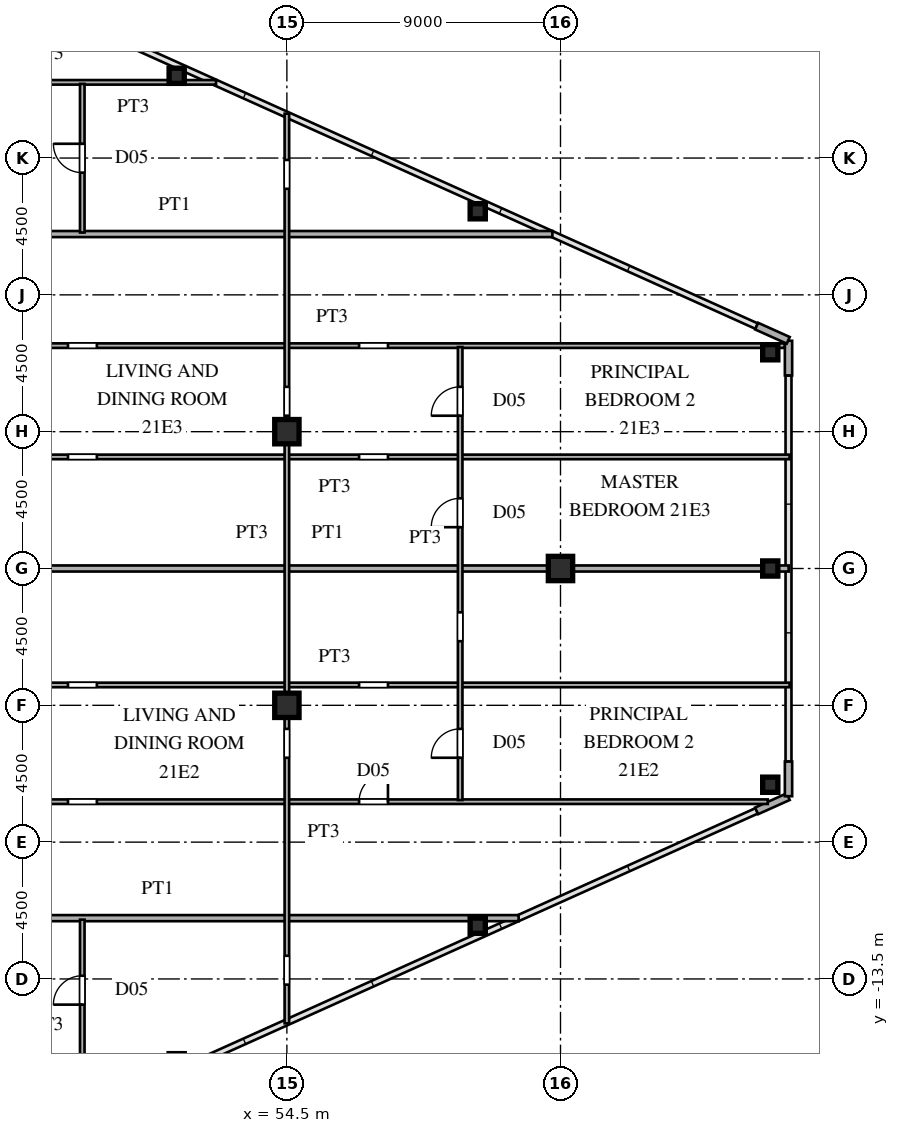
"""IFC4 building model, lengths in metres.
Left out: names, types, materials, properties, quantities, classifications, styles, units other than length and angle.
Written with IfcOpenShell. Run it as: python <this file> out.ifc"""

import sys

from ifc_helpers import new_model, si_unit, direction, frame, frame_2d, origin, origin_2d, place, context, subcontext, project, spatial, rectangle, hollow_rectangle, i_section, extrude, source, transform, mapped, element, fill, save


model = new_model("IFC4")
c1 = context("Model", 3, precision=1e-05, world=origin(), true_north=direction((0.0, 1.0)))
c2 = subcontext(c1, "Body", "Model", "MODEL_VIEW")
j1 = project(units=[si_unit("LENGTHUNIT", "METRE"), si_unit("PLANEANGLEUNIT", "RADIAN")], contexts=[c1])
p1 = place(None, origin())
s1 = spatial("IfcSite", under=j1, at=p1, CompositionType="ELEMENT")
p2 = place(p1, origin())
s2 = spatial("IfcBuilding", under=s1, at=p2, CompositionType="ELEMENT")
p3 = place(p2, frame((0.0, 0.0, 80.1)))
s3 = spatial("IfcBuildingStorey", under=s2, at=p3, CompositionType="ELEMENT", Elevation=80.1)
m1 = source(origin(), c2, "Body", "SweptSolid", [
    extrude(i_section(OverallWidth=0.8, OverallDepth=0.8, WebThickness=0.032, FlangeThickness=0.05, at=origin_2d()), origin(), (0.0, 0.0, 1.0), 3.6),
])
for number, where, z_axis, x_axis in (
    (1, (54.5, -4.5, 0.0), (0.0, 0.0, 1.0), (1.0, 0.0, 0.0)),
    (2, (54.5, 4.5, 0.0), (0.0, 0.0, 1.0), (1.0, 0.0, 0.0)),
    (3, (63.5, 0.0, 0.0), (0.0, 0.0, 1.0), (1.0, 0.0, 0.0)),
):
    element("IfcColumn", number, at=place(p3, frame(where, z_axis=z_axis, x_axis=x_axis)), inside=s3, PredefinedType="COLUMN", context=c2, shape_type="MappedRepresentation", body=[
        mapped(m1, transform((0.0, 0.0, 0.0), scale=1.0)),
    ])
m2 = source(origin(), c2, "Body", "SweptSolid", [
    extrude(hollow_rectangle(XDim=0.5, YDim=0.5, WallThickness=0.02, at=origin_2d()), origin(), (0.0, 0.0, 1.0), 3.6),
])
for number, where, z_axis, x_axis in (
    (4, (70.4, -7.112, 0.0), (0.0, 0.0, 1.0), (1.0, 0.0, 0.0)),
    (5, (70.4, 7.112, 0.0), (0.0, 0.0, 1.0), (1.0, 0.0, 0.0)),
    (6, (60.778, -11.749, 0.0), (0.0, 0.0, 1.0), (1.0, 0.0, 0.0)),
    (7, (50.875, 16.205, 0.0), (0.0, 0.0, 1.0), (1.0, 0.0, 0.0)),
    (8, (60.778, 11.749, 0.0), (0.0, 0.0, 1.0), (1.0, 0.0, 0.0)),
    (9, (70.4, 0.0, 0.0), (0.0, 0.0, 1.0), (1.0, 0.0, 0.0)),
):
    element("IfcColumn", number, at=place(p3, frame(where, z_axis=z_axis, x_axis=x_axis)), inside=s3, PredefinedType="COLUMN", context=c2, shape_type="MappedRepresentation", body=[
        mapped(m2, transform((0.0, 0.0, 0.0), scale=1.0)),
    ])
for number, where, z_axis, x_axis in (
    (10, (69.951, -7.972, 0.0), (0.0, 0.0, 1.0), (0.912, 0.41, 0.0)),
    (11, (71.0, -7.49, 0.0), (0.0, 0.0, 1.0), (0.0, 1.0, 0.0)),
    (12, (71.0, 6.35, 0.0), (0.0, 0.0, 1.0), (0.0, 1.0, 0.0)),
    (13, (70.991, 7.504, 0.0), (0.0, 0.0, 1.0), (-0.912, 0.41, 0.0)),
):
    element("IfcWall", number, at=place(p3, frame(where, z_axis=z_axis, x_axis=x_axis)), inside=s3, PredefinedType="SOLIDWALL", context=c2, shape_type="SweptSolid", body=[
        extrude(rectangle(XDim=1.14, YDim=0.24, at=frame_2d((0.57, 0.0))), origin(), (0.0, 0.0, 1.0), 3.38),
    ])
p4 = place(p3, frame((38.38, -11.5, 0.0), z_axis=(0.0, 0.0, 1.0), x_axis=(1.0, 0.0, 0.0)))
e14 = element("IfcWall", 14, at=p4, inside=s3, PredefinedType="PARTITIONING", context=c2, shape_type="SweptSolid", body=[
    extrude(rectangle(XDim=23.743, YDim=0.2, at=frame_2d((11.872, 0.0))), origin(), (0.0, 0.0, 1.0), 3.38),
])
p5 = place(p3, frame((41.1, -7.67, 0.0), z_axis=(0.0, 0.0, 1.0), x_axis=(1.0, 0.0, 0.0)))
e15 = element("IfcWall", 15, at=p5, inside=s3, PredefinedType="PARTITIONING", context=c2, shape_type="SweptSolid", body=[
    extrude(rectangle(XDim=29.218, YDim=0.15, at=frame_2d((14.609, 0.0))), origin(), (0.0, 0.0, 1.0), 3.38),
])
p6 = place(p5, frame((6.2, 0.0, 0.0)))
e16 = element("IfcOpeningElement", 16, at=p6, cuts=e15, PredefinedType="OPENING", context=c2, shape_type="SweptSolid", body=[
    extrude(rectangle(XDim=0.95, YDim=2.15, at=frame_2d((0.475, 1.075))), frame((0.0, 0.085, 0.0), z_axis=(0.0, -1.0, 0.0), x_axis=(1.0, 0.0, 0.0)), (0.0, 0.0, 1.0), 0.17),
])
p7 = place(p5, frame((15.775, 0.0, 0.0)))
e17 = element("IfcOpeningElement", 17, at=p7, cuts=e15, PredefinedType="OPENING", context=c2, shape_type="SweptSolid", body=[
    extrude(rectangle(XDim=0.95, YDim=2.15, at=frame_2d((0.475, 1.075))), frame((0.0, 0.085, 0.0), z_axis=(0.0, -1.0, 0.0), x_axis=(1.0, 0.0, 0.0)), (0.0, 0.0, 1.0), 0.17),
])
p8 = place(p3, frame((41.1, -3.83, 0.0), z_axis=(0.0, 0.0, 1.0), x_axis=(1.0, 0.0, 0.0)))
e18 = element("IfcWall", 18, at=p8, inside=s3, PredefinedType="PARTITIONING", context=c2, shape_type="SweptSolid", body=[
    extrude(rectangle(XDim=29.935, YDim=0.15, at=frame_2d((14.967, 0.0))), origin(), (0.0, 0.0, 1.0), 3.38),
])
p9 = place(p8, frame((6.2, 0.0, 0.0)))
e19 = element("IfcOpeningElement", 19, at=p9, cuts=e18, PredefinedType="OPENING", context=c2, shape_type="SweptSolid", body=[
    extrude(rectangle(XDim=0.95, YDim=2.15, at=frame_2d((0.475, 1.075))), frame((0.0, 0.085, 0.0), z_axis=(0.0, -1.0, 0.0), x_axis=(1.0, 0.0, 0.0)), (0.0, 0.0, 1.0), 0.17),
])
p10 = place(p8, frame((15.775, 0.0, 0.0)))
e20 = element("IfcOpeningElement", 20, at=p10, cuts=e18, PredefinedType="OPENING", context=c2, shape_type="SweptSolid", body=[
    extrude(rectangle(XDim=0.95, YDim=2.15, at=frame_2d((0.475, 1.075))), frame((0.0, 0.085, 0.0), z_axis=(0.0, -1.0, 0.0), x_axis=(1.0, 0.0, 0.0)), (0.0, 0.0, 1.0), 0.17),
])
p11 = place(p3, frame((38.38, 0.0, 0.0), z_axis=(0.0, 0.0, 1.0), x_axis=(1.0, 0.0, 0.0)))
e21 = element("IfcWall", 21, at=p11, inside=s3, PredefinedType="PARTITIONING", context=c2, shape_type="SweptSolid", body=[
    extrude(rectangle(XDim=25.1, YDim=0.2, at=frame_2d((12.55, 0.0))), origin(), (0.0, 0.0, 1.0), 3.38),
])
p12 = place(p3, frame((63.48, 0.0, 0.0), z_axis=(0.0, 0.0, 1.0), x_axis=(1.0, 0.0, 0.0)))
e22 = element("IfcWall", 22, at=p12, inside=s3, PredefinedType="PARTITIONING", context=c2, shape_type="SweptSolid", body=[
    extrude(rectangle(XDim=7.525, YDim=0.2, at=frame_2d((3.762, 0.0))), origin(), (0.0, 0.0, 1.0), 2.68),
])
p13 = place(p3, frame((41.1, 3.67, 0.0), z_axis=(0.0, 0.0, 1.0), x_axis=(1.0, 0.0, 0.0)))
e23 = element("IfcWall", 23, at=p13, inside=s3, PredefinedType="PARTITIONING", context=c2, shape_type="SweptSolid", body=[
    extrude(rectangle(XDim=29.935, YDim=0.15, at=frame_2d((14.967, 0.0))), origin(), (0.0, 0.0, 1.0), 3.38),
])
p14 = place(p13, frame((6.2, 0.0, 0.0)))
e24 = element("IfcOpeningElement", 24, at=p14, cuts=e23, PredefinedType="OPENING", context=c2, shape_type="SweptSolid", body=[
    extrude(rectangle(XDim=0.95, YDim=2.15, at=frame_2d((0.475, 1.075))), frame((0.0, 0.085, 0.0), z_axis=(0.0, -1.0, 0.0), x_axis=(1.0, 0.0, 0.0)), (0.0, 0.0, 1.0), 0.17),
])
p15 = place(p13, frame((15.775, 0.0, 0.0)))
e25 = element("IfcOpeningElement", 25, at=p15, cuts=e23, PredefinedType="OPENING", context=c2, shape_type="SweptSolid", body=[
    extrude(rectangle(XDim=0.95, YDim=2.15, at=frame_2d((0.475, 1.075))), frame((0.0, 0.085, 0.0), z_axis=(0.0, -1.0, 0.0), x_axis=(1.0, 0.0, 0.0)), (0.0, 0.0, 1.0), 0.17),
])
p16 = place(p3, frame((41.1, 7.33, 0.0), z_axis=(0.0, 0.0, 1.0), x_axis=(1.0, 0.0, 0.0)))
e26 = element("IfcWall", 26, at=p16, inside=s3, PredefinedType="PARTITIONING", context=c2, shape_type="SweptSolid", body=[
    extrude(rectangle(XDim=29.775, YDim=0.15, at=frame_2d((14.887, 0.0))), origin(), (0.0, 0.0, 1.0), 3.38),
])
p17 = place(p16, frame((6.2, 0.0, 0.0)))
e27 = element("IfcOpeningElement", 27, at=p17, cuts=e26, PredefinedType="OPENING", context=c2, shape_type="SweptSolid", body=[
    extrude(rectangle(XDim=0.95, YDim=2.15, at=frame_2d((0.475, 1.075))), frame((0.0, 0.085, 0.0), z_axis=(0.0, -1.0, 0.0), x_axis=(1.0, 0.0, 0.0)), (0.0, 0.0, 1.0), 0.17),
])
p18 = place(p16, frame((15.775, 0.0, 0.0)))
e28 = element("IfcOpeningElement", 28, at=p18, cuts=e26, PredefinedType="OPENING", context=c2, shape_type="SweptSolid", body=[
    extrude(rectangle(XDim=0.95, YDim=2.15, at=frame_2d((0.475, 1.075))), frame((0.0, 0.085, 0.0), z_axis=(0.0, -1.0, 0.0), x_axis=(1.0, 0.0, 0.0)), (0.0, 0.0, 1.0), 0.17),
])
p19 = place(p3, frame((38.38, 11.0, 0.0), z_axis=(0.0, 0.0, 1.0), x_axis=(1.0, 0.0, 0.0)))
e29 = element("IfcWall", 29, at=p19, inside=s3, PredefinedType="PARTITIONING", context=c2, shape_type="SweptSolid", body=[
    extrude(rectangle(XDim=24.854, YDim=0.2, at=frame_2d((12.427, 0.0))), origin(), (0.0, 0.0, 1.0), 3.38),
])
p20 = place(p3, frame((41.1, 15.99, 0.0), z_axis=(0.0, 0.0, 1.0), x_axis=(1.0, 0.0, 0.0)))
e30 = element("IfcWall", 30, at=p20, inside=s3, PredefinedType="PARTITIONING", context=c2, shape_type="SweptSolid", body=[
    extrude(rectangle(XDim=11.071, YDim=0.15, at=frame_2d((5.535, 0.0))), origin(), (0.0, 0.0, 1.0), 3.38),
])
p21 = place(p20, frame((2.837, 0.0, 0.0)))
e31 = element("IfcOpeningElement", 31, at=p21, cuts=e30, PredefinedType="OPENING", context=c2, shape_type="SweptSolid", body=[
    extrude(rectangle(XDim=0.95, YDim=2.15, at=frame_2d((0.475, 1.075))), frame((0.0, 0.085, 0.0), z_axis=(0.0, -1.0, 0.0), x_axis=(1.0, 0.0, 0.0)), (0.0, 0.0, 1.0), 0.17),
])
p22 = place(p3, frame((47.77, -16.189, 0.0), z_axis=(0.0, 0.0, 1.0), x_axis=(0.0, 1.0, 0.0)))
e32 = element("IfcWall", 32, at=p22, inside=s3, PredefinedType="PARTITIONING", context=c2, shape_type="SweptSolid", body=[
    extrude(rectangle(XDim=4.639, YDim=0.15, at=frame_2d((2.319, 0.0))), origin(), (0.0, 0.0, 1.0), 3.38),
])
p23 = place(p22, frame((1.844, 0.0, 0.0)))
e33 = element("IfcOpeningElement", 33, at=p23, cuts=e32, PredefinedType="OPENING", context=c2, shape_type="SweptSolid", body=[
    extrude(rectangle(XDim=0.95, YDim=2.15, at=frame_2d((0.475, 1.075))), frame((0.0, 0.085, 0.0), z_axis=(0.0, -1.0, 0.0), x_axis=(1.0, 0.0, 0.0)), (0.0, 0.0, 1.0), 0.17),
])
p24 = place(p3, frame((47.77, 11.05, 0.0), z_axis=(0.0, 0.0, 1.0), x_axis=(0.0, 1.0, 0.0)))
e34 = element("IfcWall", 34, at=p24, inside=s3, PredefinedType="PARTITIONING", context=c2, shape_type="SweptSolid", body=[
    extrude(rectangle(XDim=4.889, YDim=0.15, at=frame_2d((2.444, 0.0))), origin(), (0.0, 0.0, 1.0), 3.38),
])
p25 = place(p24, frame((1.969, 0.0, 0.0)))
e35 = element("IfcOpeningElement", 35, at=p25, cuts=e34, PredefinedType="OPENING", context=c2, shape_type="SweptSolid", body=[
    extrude(rectangle(XDim=0.95, YDim=2.15, at=frame_2d((0.475, 1.075))), frame((0.0, 0.085, 0.0), z_axis=(0.0, -1.0, 0.0), x_axis=(1.0, 0.0, 0.0)), (0.0, 0.0, 1.0), 0.17),
])
p26 = place(p3, frame((54.5, -14.96, 0.0), z_axis=(0.0, 0.0, 1.0), x_axis=(0.0, 1.0, 0.0)))
e36 = element("IfcWall", 36, at=p26, inside=s3, PredefinedType="PARTITIONING", context=c2, shape_type="SweptSolid", body=[
    extrude(rectangle(XDim=29.92, YDim=0.15, at=frame_2d((14.96, 0.0))), origin(), (0.0, 0.0, 1.0), 2.68),
])
p27 = place(p26, frame((1.272, 0.0, 0.0)))
e37 = element("IfcOpeningElement", 37, at=p27, cuts=e36, PredefinedType="OPENING", context=c2, shape_type="SweptSolid", body=[
    extrude(rectangle(XDim=0.95, YDim=2.15, at=frame_2d((0.475, 1.075))), frame((0.0, 0.085, 0.0), z_axis=(0.0, -1.0, 0.0), x_axis=(1.0, 0.0, 0.0)), (0.0, 0.0, 1.0), 0.17),
])
p28 = place(p26, frame((8.735, 0.0, 0.0)))
e38 = element("IfcOpeningElement", 38, at=p28, cuts=e36, PredefinedType="OPENING", context=c2, shape_type="SweptSolid", body=[
    extrude(rectangle(XDim=0.95, YDim=2.15, at=frame_2d((0.475, 1.075))), frame((0.0, 0.085, 0.0), z_axis=(0.0, -1.0, 0.0), x_axis=(1.0, 0.0, 0.0)), (0.0, 0.0, 1.0), 0.17),
])
p29 = place(p26, frame((19.985, 0.0, 0.0)))
e39 = element("IfcOpeningElement", 39, at=p29, cuts=e36, PredefinedType="OPENING", context=c2, shape_type="SweptSolid", body=[
    extrude(rectangle(XDim=0.95, YDim=2.15, at=frame_2d((0.475, 1.075))), frame((0.0, 0.085, 0.0), z_axis=(0.0, -1.0, 0.0), x_axis=(1.0, 0.0, 0.0)), (0.0, 0.0, 1.0), 0.17),
])
p30 = place(p26, frame((27.448, 0.0, 0.0)))
e40 = element("IfcOpeningElement", 40, at=p30, cuts=e36, PredefinedType="OPENING", context=c2, shape_type="SweptSolid", body=[
    extrude(rectangle(XDim=0.95, YDim=2.15, at=frame_2d((0.475, 1.075))), frame((0.0, 0.085, 0.0), z_axis=(0.0, -1.0, 0.0), x_axis=(1.0, 0.0, 0.0)), (0.0, 0.0, 1.0), 0.17),
])
p31 = place(p3, frame((60.2, -7.617, 0.0), z_axis=(0.0, 0.0, 1.0), x_axis=(0.0, 1.0, 0.0)))
e41 = element("IfcWall", 41, at=p31, inside=s3, PredefinedType="PARTITIONING", context=c2, shape_type="SweptSolid", body=[
    extrude(rectangle(XDim=14.9, YDim=0.15, at=frame_2d((7.45, 0.0))), origin(), (0.0, 0.0, 1.0), 3.38),
])
p32 = place(p31, frame((1.392, 0.0, 0.0)))
e42 = element("IfcOpeningElement", 42, at=p32, cuts=e41, PredefinedType="OPENING", context=c2, shape_type="SweptSolid", body=[
    extrude(rectangle(XDim=0.95, YDim=2.15, at=frame_2d((0.475, 1.075))), frame((0.0, 0.085, 0.0), z_axis=(0.0, -1.0, 0.0), x_axis=(1.0, 0.0, 0.0)), (0.0, 0.0, 1.0), 0.17),
])
p33 = place(p31, frame((5.225, 0.0, 0.0)))
e43 = element("IfcOpeningElement", 43, at=p33, cuts=e41, PredefinedType="OPENING", context=c2, shape_type="SweptSolid", body=[
    extrude(rectangle(XDim=0.95, YDim=2.15, at=frame_2d((0.475, 1.075))), frame((0.0, 0.085, 0.0), z_axis=(0.0, -1.0, 0.0), x_axis=(1.0, 0.0, 0.0)), (0.0, 0.0, 1.0), 0.17),
])
p34 = place(p31, frame((8.975, 0.0, 0.0)))
e44 = element("IfcOpeningElement", 44, at=p34, cuts=e41, PredefinedType="OPENING", context=c2, shape_type="SweptSolid", body=[
    extrude(rectangle(XDim=0.95, YDim=2.15, at=frame_2d((0.475, 1.075))), frame((0.0, 0.085, 0.0), z_axis=(0.0, -1.0, 0.0), x_axis=(1.0, 0.0, 0.0)), (0.0, 0.0, 1.0), 0.17),
])
p35 = place(p31, frame((12.642, 0.0, 0.0)))
e45 = element("IfcOpeningElement", 45, at=p35, cuts=e41, PredefinedType="OPENING", context=c2, shape_type="SweptSolid", body=[
    extrude(rectangle(XDim=0.95, YDim=2.15, at=frame_2d((0.475, 1.075))), frame((0.0, 0.085, 0.0), z_axis=(0.0, -1.0, 0.0), x_axis=(1.0, 0.0, 0.0)), (0.0, 0.0, 1.0), 0.17),
])
m3 = source(origin(), c2, "Body", "SweptSolid", [
    extrude(rectangle(XDim=0.95, YDim=2.15, at=frame_2d((0.475, 1.075))), frame((0.0, 0.025, 0.0), z_axis=(0.0, -1.0, 0.0), x_axis=(1.0, 0.0, 0.0)), (0.0, 0.0, 1.0), 0.05),
])
p36 = place(p7, origin())
e46 = element("IfcDoor", 46, at=p36, inside=s3, OperationType="SINGLE_SWING_RIGHT", PredefinedType="DOOR", context=c2, shape_type="MappedRepresentation", body=[
    mapped(m3, transform((0.0, 0.0, 0.0), scale=1.0)),
])
fill(e17, e46)
p37 = place(p23, origin())
e47 = element("IfcDoor", 47, at=p37, inside=s3, OperationType="SINGLE_SWING_LEFT", PredefinedType="DOOR", context=c2, shape_type="MappedRepresentation", body=[
    mapped(m3, transform((0.0, 0.0, 0.0), scale=1.0)),
])
fill(e33, e47)
p38 = place(p25, origin())
e48 = element("IfcDoor", 48, at=p38, inside=s3, OperationType="SINGLE_SWING_RIGHT", PredefinedType="DOOR", context=c2, shape_type="MappedRepresentation", body=[
    mapped(m3, transform((0.0, 0.0, 0.0), scale=1.0)),
])
fill(e35, e48)
p39 = place(p32, origin())
e49 = element("IfcDoor", 49, at=p39, inside=s3, OperationType="SINGLE_SWING_LEFT", PredefinedType="DOOR", context=c2, shape_type="MappedRepresentation", body=[
    mapped(m3, transform((0.0, 0.0, 0.0), scale=1.0)),
])
fill(e42, e49)
p40 = place(p34, origin())
e50 = element("IfcDoor", 50, at=p40, inside=s3, OperationType="SINGLE_SWING_LEFT", PredefinedType="DOOR", context=c2, shape_type="MappedRepresentation", body=[
    mapped(m3, transform((0.0, 0.0, 0.0), scale=1.0)),
])
fill(e44, e50)
p41 = place(p35, origin())
e51 = element("IfcDoor", 51, at=p41, inside=s3, OperationType="SINGLE_SWING_LEFT", PredefinedType="DOOR", context=c2, shape_type="MappedRepresentation", body=[
    mapped(m3, transform((0.0, 0.0, 0.0), scale=1.0)),
])
fill(e45, e51)
save(model, sys.argv[1])
